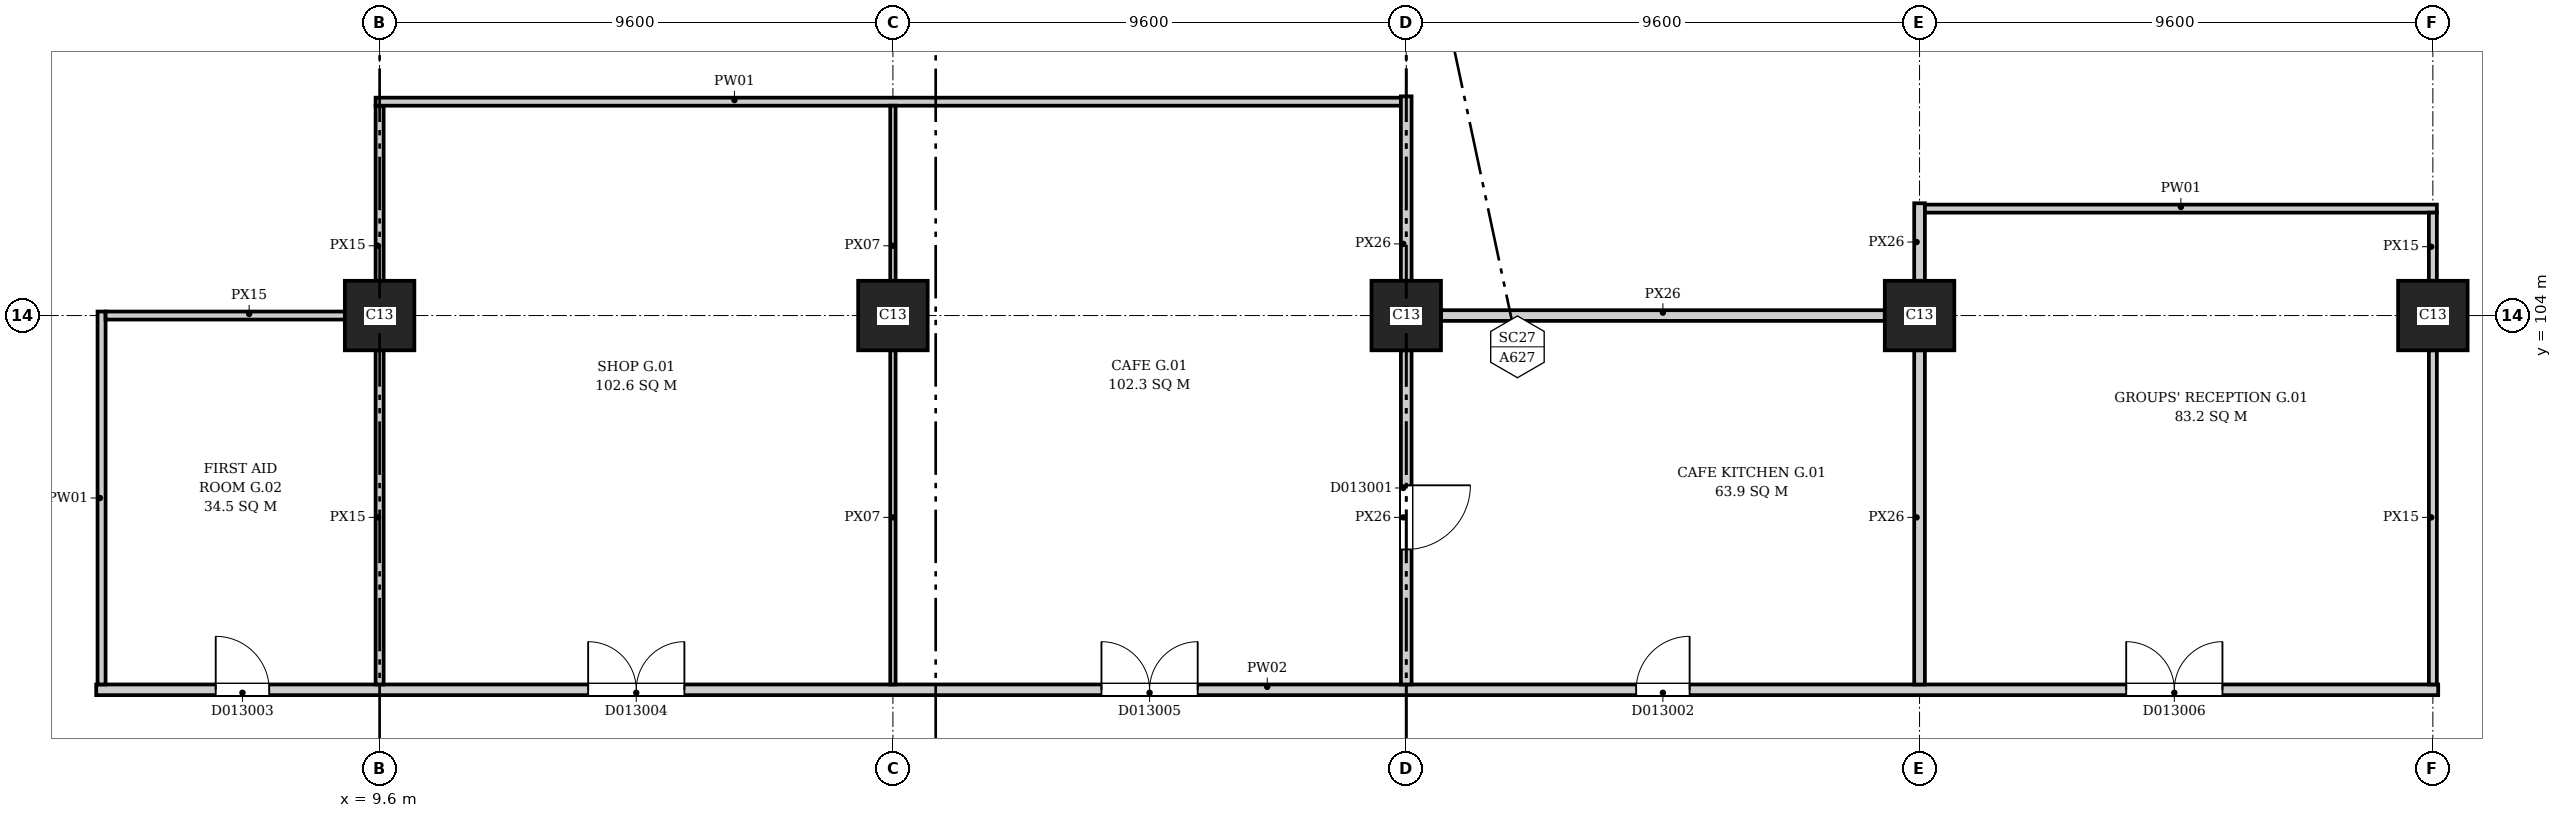
"""IFC4 building model, lengths in metres.
Left out: names, types, materials, properties, quantities, classifications, styles, units other than length and angle.
Written with IfcOpenShell. Run it as: python <this file> out.ifc"""

import sys

from ifc_helpers import new_model, si_unit, direction, frame, frame_2d, origin, origin_2d, place, context, subcontext, project, spatial, rectangle, extrude, element, fill, save


model = new_model("IFC4")
c1 = context("Model", 3, precision=1e-05, world=origin(), true_north=direction((0.0, 1.0)))
c2 = subcontext(c1, "Body", "Model", "MODEL_VIEW")
j1 = project(units=[si_unit("LENGTHUNIT", "METRE"), si_unit("PLANEANGLEUNIT", "RADIAN")], contexts=[c1])
p1 = place(None, origin())
s1 = spatial("IfcSite", under=j1, at=p1, CompositionType="ELEMENT")
p2 = place(p1, origin())
s2 = spatial("IfcBuilding", under=s1, at=p2, CompositionType="ELEMENT")
p3 = place(p2, origin())
s3 = spatial("IfcBuildingStorey", under=s2, at=p3, CompositionType="ELEMENT", Elevation=0.0)
for number, where, z_axis, x_axis in (
    (1, (9.6, 104.0, 0.0), (0.0, 0.0, 1.0), (1.0, 0.0, 0.0)),
    (2, (19.2, 104.0, 0.0), (0.0, 0.0, 1.0), (1.0, 0.0, 0.0)),
    (3, (28.8, 104.0, 0.0), (0.0, 0.0, 1.0), (1.0, 0.0, 0.0)),
    (4, (38.4, 104.0, 0.0), (0.0, 0.0, 1.0), (1.0, 0.0, 0.0)),
    (5, (48.0, 104.0, 0.0), (0.0, 0.0, 1.0), (1.0, 0.0, 0.0)),
):
    element("IfcColumn", number, at=place(p3, frame(where, z_axis=z_axis, x_axis=x_axis)), inside=s3, PredefinedType="COLUMN", context=c2, shape_type="SweptSolid", body=[
        extrude(rectangle(XDim=1.3, YDim=1.3, at=origin_2d()), origin(), (0.0, 0.0, 1.0), 6.5),
    ])
p4 = place(p3, frame((4.3, 97.0, 0.0), z_axis=(0.0, 0.0, 1.0), x_axis=(1.0, 0.0, 0.0)))
e6 = element("IfcWall", 6, at=p4, inside=s3, PredefinedType="PARTITIONING", context=c2, shape_type="SweptSolid", body=[
    extrude(rectangle(XDim=43.8, YDim=0.2, at=frame_2d((21.9, 0.0))), origin(), (0.0, 0.0, 1.0), 6.15),
])
p5 = place(p4, frame((28.8, 0.0, 0.0)))
e7 = element("IfcOpeningElement", 7, at=p5, cuts=e6, PredefinedType="OPENING", context=c2, shape_type="SweptSolid", body=[
    extrude(rectangle(XDim=1.0, YDim=2.1, at=frame_2d((0.5, 1.05))), frame((0.0, 0.11, 0.0), z_axis=(0.0, -1.0, 0.0), x_axis=(1.0, 0.0, 0.0)), (0.0, 0.0, 1.0), 0.22),
])
p6 = place(p4, frame((2.235, 0.0, 0.0)))
e8 = element("IfcOpeningElement", 8, at=p6, cuts=e6, PredefinedType="OPENING", context=c2, shape_type="SweptSolid", body=[
    extrude(rectangle(XDim=1.0, YDim=2.1, at=frame_2d((0.5, 1.05))), frame((0.0, 0.11, 0.0), z_axis=(0.0, -1.0, 0.0), x_axis=(1.0, 0.0, 0.0)), (0.0, 0.0, 1.0), 0.22),
])
p7 = place(p4, frame((9.2, 0.0, 0.0)))
e9 = element("IfcOpeningElement", 9, at=p7, cuts=e6, PredefinedType="OPENING", context=c2, shape_type="SweptSolid", body=[
    extrude(rectangle(XDim=1.8, YDim=2.1, at=frame_2d((0.9, 1.05))), frame((0.0, 0.11, 0.0), z_axis=(0.0, -1.0, 0.0), x_axis=(1.0, 0.0, 0.0)), (0.0, 0.0, 1.0), 0.22),
])
p8 = place(p4, frame((18.8, 0.0, 0.0)))
e10 = element("IfcOpeningElement", 10, at=p8, cuts=e6, PredefinedType="OPENING", context=c2, shape_type="SweptSolid", body=[
    extrude(rectangle(XDim=1.8, YDim=2.1, at=frame_2d((0.9, 1.05))), frame((0.0, 0.11, 0.0), z_axis=(0.0, -1.0, 0.0), x_axis=(1.0, 0.0, 0.0)), (0.0, 0.0, 1.0), 0.22),
])
p9 = place(p4, frame((37.965, 0.0, 0.0)))
e11 = element("IfcOpeningElement", 11, at=p9, cuts=e6, PredefinedType="OPENING", context=c2, shape_type="SweptSolid", body=[
    extrude(rectangle(XDim=1.8, YDim=2.1, at=frame_2d((0.9, 1.05))), frame((0.0, 0.11, 0.0), z_axis=(0.0, -1.0, 0.0), x_axis=(1.0, 0.0, 0.0)), (0.0, 0.0, 1.0), 0.22),
])
p10 = place(p3, frame((4.4, 97.1, 0.0), z_axis=(0.0, 0.0, 1.0), x_axis=(0.0, 1.0, 0.0)))
e12 = element("IfcWall", 12, at=p10, inside=s3, PredefinedType="PARTITIONING", context=c2, shape_type="SweptSolid", body=[
    extrude(rectangle(XDim=6.975, YDim=0.15, at=frame_2d((3.487, 0.0))), origin(), (0.0, 0.0, 1.0), 6.15),
])
p11 = place(p3, frame((4.475, 104.0, 0.0), z_axis=(0.0, 0.0, 1.0), x_axis=(1.0, 0.0, 0.0)))
e13 = element("IfcWall", 13, at=p11, inside=s3, PredefinedType="PARTITIONING", context=c2, shape_type="SweptSolid", body=[
    extrude(rectangle(XDim=4.475, YDim=0.15, at=frame_2d((2.237, 0.0))), origin(), (0.0, 0.0, 1.0), 5.75),
])
p12 = place(p3, frame((9.6, 97.1, 0.0), z_axis=(0.0, 0.0, 1.0), x_axis=(0.0, 1.0, 0.0)))
e14 = element("IfcWall", 14, at=p12, inside=s3, PredefinedType="PARTITIONING", context=c2, shape_type="SweptSolid", body=[
    extrude(rectangle(XDim=6.25, YDim=0.15, at=frame_2d((3.125, 0.0))), origin(), (0.0, 0.0, 1.0), 5.75),
])
p13 = place(p3, frame((9.6, 104.65, 0.0), z_axis=(0.0, 0.0, 1.0), x_axis=(0.0, 1.0, 0.0)))
e15 = element("IfcWall", 15, at=p13, inside=s3, PredefinedType="PARTITIONING", context=c2, shape_type="SweptSolid", body=[
    extrude(rectangle(XDim=3.275, YDim=0.15, at=frame_2d((1.638, 0.0))), origin(), (0.0, 0.0, 1.0), 5.75),
])
p14 = place(p3, frame((9.525, 108.0, 0.0), z_axis=(0.0, 0.0, 1.0), x_axis=(1.0, 0.0, 0.0)))
e16 = element("IfcWall", 16, at=p14, inside=s3, PredefinedType="PARTITIONING", context=c2, shape_type="SweptSolid", body=[
    extrude(rectangle(XDim=19.175, YDim=0.15, at=frame_2d((9.587, 0.0))), origin(), (0.0, 0.0, 1.0), 6.15),
])
p15 = place(p3, frame((19.2, 97.1, 0.0), z_axis=(0.0, 0.0, 1.0), x_axis=(0.0, 1.0, 0.0)))
e17 = element("IfcWall", 17, at=p15, inside=s3, PredefinedType="PARTITIONING", context=c2, shape_type="SweptSolid", body=[
    extrude(rectangle(XDim=6.25, YDim=0.1, at=frame_2d((3.125, 0.0))), origin(), (0.0, 0.0, 1.0), 5.75),
])
p16 = place(p3, frame((19.2, 104.65, 0.0), z_axis=(0.0, 0.0, 1.0), x_axis=(0.0, 1.0, 0.0)))
e18 = element("IfcWall", 18, at=p16, inside=s3, PredefinedType="PARTITIONING", context=c2, shape_type="SweptSolid", body=[
    extrude(rectangle(XDim=3.275, YDim=0.1, at=frame_2d((1.638, 0.0))), origin(), (0.0, 0.0, 1.0), 5.75),
])
p17 = place(p3, frame((28.8, 97.1, 0.0), z_axis=(0.0, 0.0, 1.0), x_axis=(0.0, 1.0, 0.0)))
e19 = element("IfcWall", 19, at=p17, inside=s3, PredefinedType="PARTITIONING", context=c2, shape_type="SweptSolid", body=[
    extrude(rectangle(XDim=6.25, YDim=0.2, at=frame_2d((3.125, 0.0))), origin(), (0.0, 0.0, 1.0), 5.75),
])
p18 = place(p17, frame((2.525, 0.0, 0.0)))
e20 = element("IfcOpeningElement", 20, at=p18, cuts=e19, PredefinedType="OPENING", context=c2, shape_type="SweptSolid", body=[
    extrude(rectangle(XDim=1.2, YDim=2.1, at=frame_2d((0.6, 1.05))), frame((0.0, 0.11, 0.0), z_axis=(0.0, -1.0, 0.0), x_axis=(1.0, 0.0, 0.0)), (0.0, 0.0, 1.0), 0.22),
])
p19 = place(p3, frame((28.8, 104.65, 0.0), z_axis=(0.0, 0.0, 1.0), x_axis=(0.0, 1.0, 0.0)))
e21 = element("IfcWall", 21, at=p19, inside=s3, PredefinedType="PARTITIONING", context=c2, shape_type="SweptSolid", body=[
    extrude(rectangle(XDim=3.45, YDim=0.2, at=frame_2d((1.725, 0.0))), origin(), (0.0, 0.0, 1.0), 5.75),
])
p20 = place(p3, frame((29.45, 104.0, 0.0), z_axis=(0.0, 0.0, 1.0), x_axis=(1.0, 0.0, 0.0)))
e22 = element("IfcWall", 22, at=p20, inside=s3, PredefinedType="PARTITIONING", context=c2, shape_type="SweptSolid", body=[
    extrude(rectangle(XDim=8.3, YDim=0.2, at=frame_2d((4.15, 0.0))), origin(), (0.0, 0.0, 1.0), 5.75),
])
p21 = place(p3, frame((38.4, 97.1, 0.0), z_axis=(0.0, 0.0, 1.0), x_axis=(0.0, 1.0, 0.0)))
e23 = element("IfcWall", 23, at=p21, inside=s3, PredefinedType="PARTITIONING", context=c2, shape_type="SweptSolid", body=[
    extrude(rectangle(XDim=6.25, YDim=0.2, at=frame_2d((3.125, 0.0))), origin(), (0.0, 0.0, 1.0), 5.75),
])
p22 = place(p3, frame((38.4, 104.65, 0.0), z_axis=(0.0, 0.0, 1.0), x_axis=(0.0, 1.0, 0.0)))
e24 = element("IfcWall", 24, at=p22, inside=s3, PredefinedType="PARTITIONING", context=c2, shape_type="SweptSolid", body=[
    extrude(rectangle(XDim=1.45, YDim=0.2, at=frame_2d((0.725, 0.0))), origin(), (0.0, 0.0, 1.0), 5.75),
])
p23 = place(p3, frame((38.5, 106.0, 0.0), z_axis=(0.0, 0.0, 1.0), x_axis=(1.0, 0.0, 0.0)))
e25 = element("IfcWall", 25, at=p23, inside=s3, PredefinedType="PARTITIONING", context=c2, shape_type="SweptSolid", body=[
    extrude(rectangle(XDim=9.575, YDim=0.15, at=frame_2d((4.788, 0.0))), origin(), (0.0, 0.0, 1.0), 6.15),
])
p24 = place(p3, frame((48.0, 97.1, 0.0), z_axis=(0.0, 0.0, 1.0), x_axis=(0.0, 1.0, 0.0)))
e26 = element("IfcWall", 26, at=p24, inside=s3, PredefinedType="PARTITIONING", context=c2, shape_type="SweptSolid", body=[
    extrude(rectangle(XDim=6.25, YDim=0.15, at=frame_2d((3.125, 0.0))), origin(), (0.0, 0.0, 1.0), 5.75),
])
p25 = place(p3, frame((48.0, 104.65, 0.0), z_axis=(0.0, 0.0, 1.0), x_axis=(0.0, 1.0, 0.0)))
e27 = element("IfcWall", 27, at=p25, inside=s3, PredefinedType="PARTITIONING", context=c2, shape_type="SweptSolid", body=[
    extrude(rectangle(XDim=1.275, YDim=0.15, at=frame_2d((0.638, 0.0))), origin(), (0.0, 0.0, 1.0), 5.75),
])
p26 = place(p18, origin())
e28 = element("IfcDoor", 28, at=p26, inside=s3, OperationType="SINGLE_SWING_RIGHT", PredefinedType="DOOR", context=c2, shape_type="SweptSolid", body=[
    extrude(rectangle(XDim=1.2, YDim=2.1, at=frame_2d((0.6, 1.05))), frame((0.0, 0.025, 0.0), z_axis=(0.0, -1.0, 0.0), x_axis=(1.0, 0.0, 0.0)), (0.0, 0.0, 1.0), 0.05),
])
fill(e20, e28)
p27 = place(p5, origin())
e29 = element("IfcDoor", 29, at=p27, inside=s3, OperationType="SINGLE_SWING_RIGHT", PredefinedType="DOOR", context=c2, shape_type="SweptSolid", body=[
    extrude(rectangle(XDim=1.0, YDim=2.1, at=frame_2d((0.5, 1.05))), frame((0.0, 0.025, 0.0), z_axis=(0.0, -1.0, 0.0), x_axis=(1.0, 0.0, 0.0)), (0.0, 0.0, 1.0), 0.05),
])
fill(e7, e29)
p28 = place(p6, origin())
e30 = element("IfcDoor", 30, at=p28, inside=s3, OperationType="SINGLE_SWING_LEFT", PredefinedType="DOOR", context=c2, shape_type="SweptSolid", body=[
    extrude(rectangle(XDim=1.0, YDim=2.1, at=frame_2d((0.5, 1.05))), frame((0.0, 0.025, 0.0), z_axis=(0.0, -1.0, 0.0), x_axis=(1.0, 0.0, 0.0)), (0.0, 0.0, 1.0), 0.05),
])
fill(e8, e30)
p29 = place(p7, origin())
e31 = element("IfcDoor", 31, at=p29, inside=s3, OperationType="DOUBLE_DOOR_SINGLE_SWING", PredefinedType="DOOR", context=c2, shape_type="SweptSolid", body=[
    extrude(rectangle(XDim=1.8, YDim=2.1, at=frame_2d((0.9, 1.05))), frame((0.0, 0.025, 0.0), z_axis=(0.0, -1.0, 0.0), x_axis=(1.0, 0.0, 0.0)), (0.0, 0.0, 1.0), 0.05),
])
fill(e9, e31)
p30 = place(p8, origin())
e32 = element("IfcDoor", 32, at=p30, inside=s3, OperationType="DOUBLE_DOOR_SINGLE_SWING", PredefinedType="DOOR", context=c2, shape_type="SweptSolid", body=[
    extrude(rectangle(XDim=1.8, YDim=2.1, at=frame_2d((0.9, 1.05))), frame((0.0, 0.025, 0.0), z_axis=(0.0, -1.0, 0.0), x_axis=(1.0, 0.0, 0.0)), (0.0, 0.0, 1.0), 0.05),
])
fill(e10, e32)
p31 = place(p9, origin())
e33 = element("IfcDoor", 33, at=p31, inside=s3, OperationType="DOUBLE_DOOR_SINGLE_SWING", PredefinedType="DOOR", context=c2, shape_type="SweptSolid", body=[
    extrude(rectangle(XDim=1.8, YDim=2.1, at=frame_2d((0.9, 1.05))), frame((0.0, 0.025, 0.0), z_axis=(0.0, -1.0, 0.0), x_axis=(1.0, 0.0, 0.0)), (0.0, 0.0, 1.0), 0.05),
])
fill(e11, e33)
save(model, sys.argv[1])
